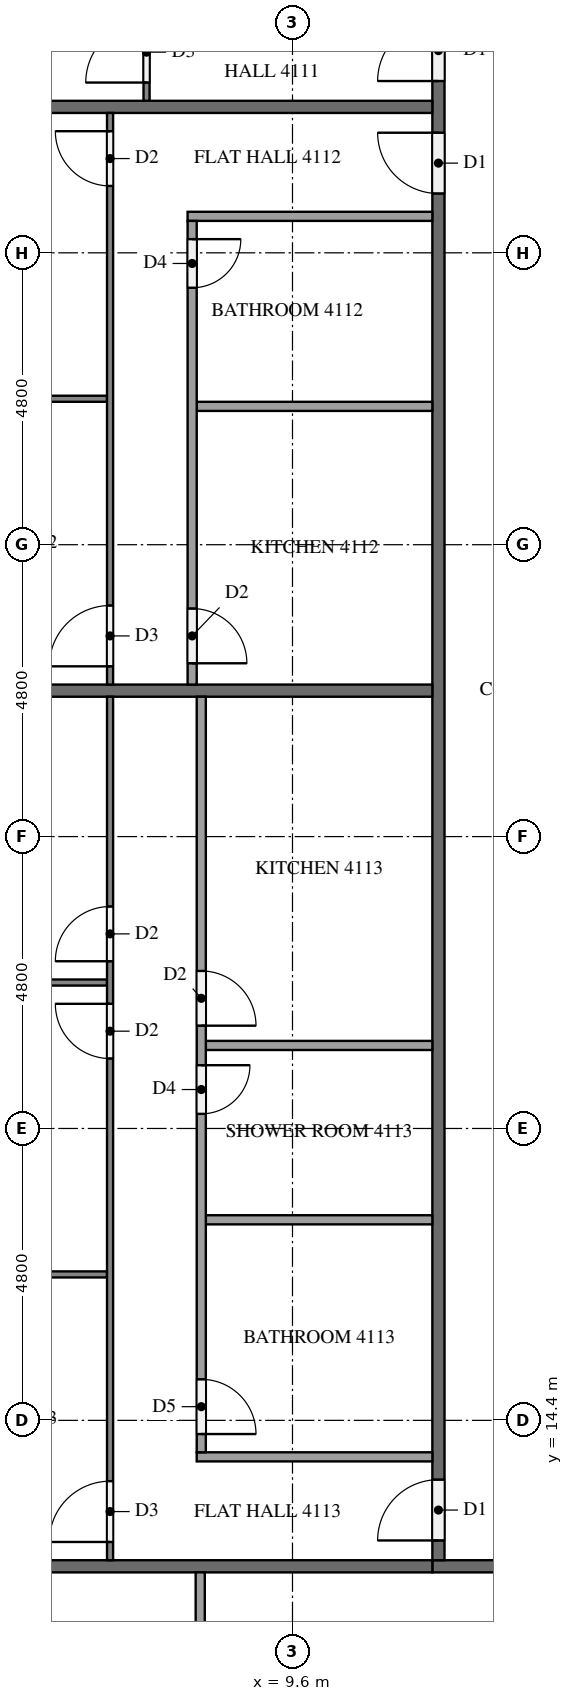
"""IFC4 building model, lengths in metres.
Left out: names, types, materials, properties, quantities, classifications, styles, units other than length and angle.
Written with IfcOpenShell. Run it as: python <this file> out.ifc"""

import sys

from ifc_helpers import new_model, si_unit, direction, frame, frame_2d, origin, place, context, subcontext, project, spatial, rectangle, extrude, element, fill, save


model = new_model("IFC4")
c1 = context("Model", 3, precision=1e-05, world=origin(), true_north=direction((0.0, 1.0)))
c2 = subcontext(c1, "Body", "Model", "MODEL_VIEW")
j1 = project(units=[si_unit("LENGTHUNIT", "METRE"), si_unit("PLANEANGLEUNIT", "RADIAN")], contexts=[c1])
p1 = place(None, origin())
s1 = spatial("IfcSite", under=j1, at=p1, CompositionType="ELEMENT")
p2 = place(p1, origin())
s2 = spatial("IfcBuilding", under=s1, at=p2, CompositionType="ELEMENT")
p3 = place(p2, frame((0.0, 0.0, 159.5)))
s3 = spatial("IfcBuildingStorey", under=s2, at=p3, CompositionType="ELEMENT", Elevation=159.5)
p4 = place(p3, frame((50.5, 12.0, 0.0), z_axis=(0.0, 0.0, 1.0), x_axis=(-1.0, 0.0, 0.0)))
e1 = element("IfcWall", 1, at=p4, inside=s3, PredefinedType="PARTITIONING", context=c2, shape_type="SweptSolid", body=[
    extrude(rectangle(XDim=38.6, YDim=0.2, at=frame_2d((19.3, 0.0))), origin(), (0.0, 0.0, 1.0), 3.2),
])
p5 = place(p4, frame((34.125, 0.0, 0.0)))
e2 = element("IfcOpeningElement", 2, at=p5, cuts=e1, PredefinedType="OPENING", context=c2, shape_type="SweptSolid", body=[
    extrude(rectangle(XDim=1.0, YDim=2.1, at=frame_2d((0.5, 1.05))), frame((0.0, 0.11, 0.0), z_axis=(0.0, -1.0, 0.0), x_axis=(1.0, 0.0, 0.0)), (0.0, 0.0, 1.0), 0.22),
])
p6 = place(p4, frame((32.275, 0.0, 0.0)))
e3 = element("IfcOpeningElement", 3, at=p6, cuts=e1, PredefinedType="OPENING", context=c2, shape_type="SweptSolid", body=[
    extrude(rectangle(XDim=1.0, YDim=2.1, at=frame_2d((0.5, 1.05))), frame((0.0, 0.11, 0.0), z_axis=(0.0, -1.0, 0.0), x_axis=(1.0, 0.0, 0.0)), (0.0, 0.0, 1.0), 0.22),
])
p7 = place(p4, frame((12.525, 0.0, 0.0)))
e4 = element("IfcOpeningElement", 4, at=p7, cuts=e1, PredefinedType="OPENING", context=c2, shape_type="SweptSolid", body=[
    extrude(rectangle(XDim=1.0, YDim=2.1, at=frame_2d((0.5, 1.05))), frame((0.0, 0.11, 0.0), z_axis=(0.0, -1.0, 0.0), x_axis=(1.0, 0.0, 0.0)), (0.0, 0.0, 1.0), 0.22),
])
p8 = place(p4, frame((10.625, 0.0, 0.0)))
e5 = element("IfcOpeningElement", 5, at=p8, cuts=e1, PredefinedType="OPENING", context=c2, shape_type="SweptSolid", body=[
    extrude(rectangle(XDim=1.1, YDim=2.1, at=frame_2d((0.55, 1.05))), frame((0.0, 0.11, 0.0), z_axis=(0.0, -1.0, 0.0), x_axis=(1.0, 0.0, 0.0)), (0.0, 0.0, 1.0), 0.22),
])
p9 = place(p3, frame((12.0, 12.1, 0.0), z_axis=(0.0, 0.0, 1.0), x_axis=(0.0, 1.0, 0.0)))
e6 = element("IfcWall", 6, at=p9, inside=s3, PredefinedType="PARTITIONING", context=c2, shape_type="SweptSolid", body=[
    extrude(rectangle(XDim=28.6, YDim=0.2, at=frame_2d((14.3, 0.0))), origin(), (0.0, 0.0, 1.0), 3.2),
])
p10 = place(p9, frame((24.325, 0.0, 0.0)))
e7 = element("IfcOpeningElement", 7, at=p10, cuts=e6, PredefinedType="OPENING", context=c2, shape_type="SweptSolid", body=[
    extrude(rectangle(XDim=1.0, YDim=2.1, at=frame_2d((0.5, 1.05))), frame((0.0, 0.11, 0.0), z_axis=(0.0, -1.0, 0.0), x_axis=(1.0, 0.0, 0.0)), (0.0, 0.0, 1.0), 0.22),
])
p11 = place(p9, frame((22.475, 0.0, 0.0)))
e8 = element("IfcOpeningElement", 8, at=p11, cuts=e6, PredefinedType="OPENING", context=c2, shape_type="SweptSolid", body=[
    extrude(rectangle(XDim=1.0, YDim=2.1, at=frame_2d((0.5, 1.05))), frame((0.0, 0.11, 0.0), z_axis=(0.0, -1.0, 0.0), x_axis=(1.0, 0.0, 0.0)), (0.0, 0.0, 1.0), 0.22),
])
p12 = place(p9, frame((0.325, 0.0, 0.0)))
e9 = element("IfcOpeningElement", 9, at=p12, cuts=e6, PredefinedType="OPENING", context=c2, shape_type="SweptSolid", body=[
    extrude(rectangle(XDim=1.0, YDim=2.1, at=frame_2d((0.5, 1.05))), frame((0.0, 0.11, 0.0), z_axis=(0.0, -1.0, 0.0), x_axis=(1.0, 0.0, 0.0)), (0.0, 0.0, 1.0), 0.22),
])
for number, where, z_axis, x_axis in (
    (10, (0.1, 12.0, 0.0), (0.0, 0.0, 1.0), (1.0, 0.0, 0.0)),
    (11, (0.1, 36.0, 0.0), (0.0, 0.0, 1.0), (1.0, 0.0, 0.0)),
    (12, (0.1, 26.4, 0.0), (0.0, 0.0, 1.0), (1.0, 0.0, 0.0)),
):
    element("IfcWall", number, at=place(p3, frame(where, z_axis=z_axis, x_axis=x_axis)), inside=s3, PredefinedType="PARTITIONING", context=c2, shape_type="SweptSolid", body=[
        extrude(rectangle(XDim=11.8, YDim=0.2, at=frame_2d((5.9, 0.0))), origin(), (0.0, 0.0, 1.0), 3.2),
    ])
p13 = place(p3, frame((8.083, 11.9, 0.0), z_axis=(0.0, 0.0, 1.0), x_axis=(0.0, -1.0, 0.0)))
e13 = element("IfcWall", 13, at=p13, inside=s3, PredefinedType="PARTITIONING", context=c2, shape_type="SweptSolid", body=[
    extrude(rectangle(XDim=2.975, YDim=0.15, at=frame_2d((1.487, 0.0))), origin(), (0.0, 0.0, 1.0), 3.2),
])
p14 = place(p3, frame((7.2, 36.1, 0.0), z_axis=(0.0, 0.0, 1.0), x_axis=(0.0, 1.0, 0.0)))
e14 = element("IfcWall", 14, at=p14, inside=s3, PredefinedType="PARTITIONING", context=c2, shape_type="SweptSolid", body=[
    extrude(rectangle(XDim=11.8, YDim=0.1, at=frame_2d((5.9, 0.0))), origin(), (0.0, 0.0, 1.0), 3.2),
])
p15 = place(p14, frame((0.3, 0.0, 0.0)))
e15 = element("IfcOpeningElement", 15, at=p15, cuts=e14, PredefinedType="OPENING", context=c2, shape_type="SweptSolid", body=[
    extrude(rectangle(XDim=1.0, YDim=2.1, at=frame_2d((0.5, 1.05))), frame((0.0, 0.06, 0.0), z_axis=(0.0, -1.0, 0.0), x_axis=(1.0, 0.0, 0.0)), (0.0, 0.0, 1.0), 0.12),
])
p16 = place(p14, frame((10.6, 0.0, 0.0)))
e16 = element("IfcOpeningElement", 16, at=p16, cuts=e14, PredefinedType="OPENING", context=c2, shape_type="SweptSolid", body=[
    extrude(rectangle(XDim=0.9, YDim=2.1, at=frame_2d((0.45, 1.05))), frame((0.0, 0.06, 0.0), z_axis=(0.0, -1.0, 0.0), x_axis=(1.0, 0.0, 0.0)), (0.0, 0.0, 1.0), 0.12),
])
p17 = place(p3, frame((6.55, 31.2, 0.0), z_axis=(0.0, 0.0, 1.0), x_axis=(-1.0, 0.0, 0.0)))
e17 = element("IfcWall", 17, at=p17, inside=s3, PredefinedType="PARTITIONING", context=c2, shape_type="SweptSolid", body=[
    extrude(rectangle(XDim=6.45, YDim=0.1, at=frame_2d((3.225, 0.0))), origin(), (0.0, 0.0, 1.0), 3.2),
])
p18 = place(p3, frame((6.6, 26.5, 0.0), z_axis=(0.0, 0.0, 1.0), x_axis=(0.0, 1.0, 0.0)))
e18 = element("IfcWall", 18, at=p18, inside=s3, PredefinedType="PARTITIONING", context=c2, shape_type="SweptSolid", body=[
    extrude(rectangle(XDim=9.4, YDim=0.1, at=frame_2d((4.7, 0.0))), origin(), (0.0, 0.0, 1.0), 3.2),
])
p19 = place(p18, frame((8.2, 0.0, 0.0)))
e19 = element("IfcOpeningElement", 19, at=p19, cuts=e18, PredefinedType="OPENING", context=c2, shape_type="SweptSolid", body=[
    extrude(rectangle(XDim=0.9, YDim=2.1, at=frame_2d((0.45, 1.05))), frame((0.0, 0.06, 0.0), z_axis=(0.0, -1.0, 0.0), x_axis=(1.0, 0.0, 0.0)), (0.0, 0.0, 1.0), 0.12),
])
p20 = place(p18, frame((0.3, 0.0, 0.0)))
e20 = element("IfcOpeningElement", 20, at=p20, cuts=e18, PredefinedType="OPENING", context=c2, shape_type="SweptSolid", body=[
    extrude(rectangle(XDim=1.0, YDim=2.1, at=frame_2d((0.5, 1.05))), frame((0.0, 0.06, 0.0), z_axis=(0.0, -1.0, 0.0), x_axis=(1.0, 0.0, 0.0)), (0.0, 0.0, 1.0), 0.12),
])
p21 = place(p3, frame((11.9, 31.075, 0.0), z_axis=(0.0, 0.0, 1.0), x_axis=(-1.0, 0.0, 0.0)))
e21 = element("IfcWall", 21, at=p21, inside=s3, PredefinedType="PARTITIONING", context=c2, shape_type="SweptSolid", body=[
    extrude(rectangle(XDim=3.875, YDim=0.15, at=frame_2d((1.938, 0.0))), origin(), (0.0, 0.0, 1.0), 3.2),
])
p22 = place(p3, frame((11.9, 34.2, 0.0), z_axis=(0.0, 0.0, 1.0), x_axis=(-1.0, 0.0, 0.0)))
e22 = element("IfcWall", 22, at=p22, inside=s3, PredefinedType="PARTITIONING", context=c2, shape_type="SweptSolid", body=[
    extrude(rectangle(XDim=4.025, YDim=0.15, at=frame_2d((2.012, 0.0))), origin(), (0.0, 0.0, 1.0), 3.2),
])
p23 = place(p3, frame((7.95, 34.125, 0.0), z_axis=(0.0, 0.0, 1.0), x_axis=(0.0, -1.0, 0.0)))
e23 = element("IfcWall", 23, at=p23, inside=s3, PredefinedType="PARTITIONING", context=c2, shape_type="SweptSolid", body=[
    extrude(rectangle(XDim=7.625, YDim=0.15, at=frame_2d((3.812, 0.0))), origin(), (0.0, 0.0, 1.0), 3.2),
])
p24 = place(p23, frame((0.3, 0.0, 0.0)))
e24 = element("IfcOpeningElement", 24, at=p24, cuts=e23, PredefinedType="OPENING", context=c2, shape_type="SweptSolid", body=[
    extrude(rectangle(XDim=0.8, YDim=2.1, at=frame_2d((0.4, 1.05))), frame((0.0, 0.085, 0.0), z_axis=(0.0, -1.0, 0.0), x_axis=(1.0, 0.0, 0.0)), (0.0, 0.0, 1.0), 0.17),
])
p25 = place(p23, frame((6.375, 0.0, 0.0)))
e25 = element("IfcOpeningElement", 25, at=p25, cuts=e23, PredefinedType="OPENING", context=c2, shape_type="SweptSolid", body=[
    extrude(rectangle(XDim=0.9, YDim=2.1, at=frame_2d((0.45, 1.05))), frame((0.0, 0.085, 0.0), z_axis=(0.0, -1.0, 0.0), x_axis=(1.0, 0.0, 0.0)), (0.0, 0.0, 1.0), 0.17),
])
for number, where, z_axis, x_axis in (
    (26, (6.55, 16.8, 0.0), (0.0, 0.0, 1.0), (-1.0, 0.0, 0.0)),
    (27, (6.55, 21.6, 0.0), (0.0, 0.0, 1.0), (-1.0, 0.0, 0.0)),
):
    element("IfcWall", number, at=place(p3, frame(where, z_axis=z_axis, x_axis=x_axis)), inside=s3, PredefinedType="PARTITIONING", context=c2, shape_type="SweptSolid", body=[
        extrude(rectangle(XDim=6.45, YDim=0.1, at=frame_2d((3.225, 0.0))), origin(), (0.0, 0.0, 1.0), 3.2),
    ])
p26 = place(p3, frame((6.6, 12.1, 0.0), z_axis=(0.0, 0.0, 1.0), x_axis=(0.0, 1.0, 0.0)))
e28 = element("IfcWall", 28, at=p26, inside=s3, PredefinedType="PARTITIONING", context=c2, shape_type="SweptSolid", body=[
    extrude(rectangle(XDim=14.2, YDim=0.1, at=frame_2d((7.1, 0.0))), origin(), (0.0, 0.0, 1.0), 3.2),
])
p27 = place(p26, frame((0.3, 0.0, 0.0)))
e29 = element("IfcOpeningElement", 29, at=p27, cuts=e28, PredefinedType="OPENING", context=c2, shape_type="SweptSolid", body=[
    extrude(rectangle(XDim=1.0, YDim=2.1, at=frame_2d((0.5, 1.05))), frame((0.0, 0.06, 0.0), z_axis=(0.0, -1.0, 0.0), x_axis=(1.0, 0.0, 0.0)), (0.0, 0.0, 1.0), 0.12),
])
p28 = place(p26, frame((8.25, 0.0, 0.0)))
e30 = element("IfcOpeningElement", 30, at=p28, cuts=e28, PredefinedType="OPENING", context=c2, shape_type="SweptSolid", body=[
    extrude(rectangle(XDim=0.9, YDim=2.1, at=frame_2d((0.45, 1.05))), frame((0.0, 0.06, 0.0), z_axis=(0.0, -1.0, 0.0), x_axis=(1.0, 0.0, 0.0)), (0.0, 0.0, 1.0), 0.12),
])
p29 = place(p26, frame((9.85, 0.0, 0.0)))
e31 = element("IfcOpeningElement", 31, at=p29, cuts=e28, PredefinedType="OPENING", context=c2, shape_type="SweptSolid", body=[
    extrude(rectangle(XDim=0.9, YDim=2.1, at=frame_2d((0.45, 1.05))), frame((0.0, 0.06, 0.0), z_axis=(0.0, -1.0, 0.0), x_axis=(1.0, 0.0, 0.0)), (0.0, 0.0, 1.0), 0.12),
])
for number, where, z_axis, x_axis in (
    (32, (11.9, 17.698, 0.0), (0.0, 0.0, 1.0), (-1.0, 0.0, 0.0)),
    (33, (11.9, 20.565, 0.0), (0.0, 0.0, 1.0), (-1.0, 0.0, 0.0)),
):
    element("IfcWall", number, at=place(p3, frame(where, z_axis=z_axis, x_axis=x_axis)), inside=s3, PredefinedType="PARTITIONING", context=c2, shape_type="SweptSolid", body=[
        extrude(rectangle(XDim=3.725, YDim=0.15, at=frame_2d((1.862, 0.0))), origin(), (0.0, 0.0, 1.0), 3.2),
    ])
p30 = place(p3, frame((11.9, 13.8, 0.0), z_axis=(0.0, 0.0, 1.0), x_axis=(-1.0, 0.0, 0.0)))
e34 = element("IfcWall", 34, at=p30, inside=s3, PredefinedType="PARTITIONING", context=c2, shape_type="SweptSolid", body=[
    extrude(rectangle(XDim=3.875, YDim=0.15, at=frame_2d((1.938, 0.0))), origin(), (0.0, 0.0, 1.0), 3.2),
])
p31 = place(p3, frame((8.1, 26.3, 0.0), z_axis=(0.0, 0.0, 1.0), x_axis=(0.0, -1.0, 0.0)))
e35 = element("IfcWall", 35, at=p31, inside=s3, PredefinedType="PARTITIONING", context=c2, shape_type="SweptSolid", body=[
    extrude(rectangle(XDim=12.425, YDim=0.15, at=frame_2d((6.212, 0.0))), origin(), (0.0, 0.0, 1.0), 3.2),
])
p32 = place(p31, frame((11.225, 0.0, 0.0)))
e36 = element("IfcOpeningElement", 36, at=p32, cuts=e35, PredefinedType="OPENING", context=c2, shape_type="SweptSolid", body=[
    extrude(rectangle(XDim=0.9, YDim=2.1, at=frame_2d((0.45, 1.05))), frame((0.0, 0.085, 0.0), z_axis=(0.0, -1.0, 0.0), x_axis=(1.0, 0.0, 0.0)), (0.0, 0.0, 1.0), 0.17),
])
p33 = place(p31, frame((6.06, 0.0, 0.0)))
e37 = element("IfcOpeningElement", 37, at=p33, cuts=e35, PredefinedType="OPENING", context=c2, shape_type="SweptSolid", body=[
    extrude(rectangle(XDim=0.8, YDim=2.1, at=frame_2d((0.4, 1.05))), frame((0.0, 0.085, 0.0), z_axis=(0.0, -1.0, 0.0), x_axis=(1.0, 0.0, 0.0)), (0.0, 0.0, 1.0), 0.17),
])
p34 = place(p31, frame((4.51, 0.0, 0.0)))
e38 = element("IfcOpeningElement", 38, at=p34, cuts=e35, PredefinedType="OPENING", context=c2, shape_type="SweptSolid", body=[
    extrude(rectangle(XDim=0.9, YDim=2.1, at=frame_2d((0.45, 1.05))), frame((0.0, 0.085, 0.0), z_axis=(0.0, -1.0, 0.0), x_axis=(1.0, 0.0, 0.0)), (0.0, 0.0, 1.0), 0.17),
])
p35 = place(p10, origin())
e39 = element("IfcDoor", 39, at=p35, inside=s3, OperationType="SINGLE_SWING_LEFT", PredefinedType="DOOR", context=c2, shape_type="SweptSolid", body=[
    extrude(rectangle(XDim=1.0, YDim=2.1, at=frame_2d((0.5, 1.05))), frame((0.0, 0.025, 0.0), z_axis=(0.0, -1.0, 0.0), x_axis=(1.0, 0.0, 0.0)), (0.0, 0.0, 1.0), 0.05),
])
fill(e7, e39)
p36 = place(p11, origin())
e40 = element("IfcDoor", 40, at=p36, inside=s3, OperationType="SINGLE_SWING_RIGHT", PredefinedType="DOOR", context=c2, shape_type="SweptSolid", body=[
    extrude(rectangle(XDim=1.0, YDim=2.1, at=frame_2d((0.5, 1.05))), frame((0.0, 0.025, 0.0), z_axis=(0.0, -1.0, 0.0), x_axis=(1.0, 0.0, 0.0)), (0.0, 0.0, 1.0), 0.05),
])
fill(e8, e40)
p37 = place(p12, origin())
e41 = element("IfcDoor", 41, at=p37, inside=s3, OperationType="SINGLE_SWING_LEFT", PredefinedType="DOOR", context=c2, shape_type="SweptSolid", body=[
    extrude(rectangle(XDim=1.0, YDim=2.1, at=frame_2d((0.5, 1.05))), frame((0.0, 0.025, 0.0), z_axis=(0.0, -1.0, 0.0), x_axis=(1.0, 0.0, 0.0)), (0.0, 0.0, 1.0), 0.05),
])
fill(e9, e41)
p38 = place(p15, origin())
e42 = element("IfcDoor", 42, at=p38, inside=s3, OperationType="SINGLE_SWING_LEFT", PredefinedType="DOOR", context=c2, shape_type="SweptSolid", body=[
    extrude(rectangle(XDim=1.0, YDim=2.1, at=frame_2d((0.5, 1.05))), frame((0.0, 0.025, 0.0), z_axis=(0.0, -1.0, 0.0), x_axis=(1.0, 0.0, 0.0)), (0.0, 0.0, 1.0), 0.05),
])
fill(e15, e42)
p39 = place(p19, origin())
e43 = element("IfcDoor", 43, at=p39, inside=s3, OperationType="SINGLE_SWING_RIGHT", PredefinedType="DOOR", context=c2, shape_type="SweptSolid", body=[
    extrude(rectangle(XDim=0.9, YDim=2.1, at=frame_2d((0.45, 1.05))), frame((0.0, 0.025, 0.0), z_axis=(0.0, -1.0, 0.0), x_axis=(1.0, 0.0, 0.0)), (0.0, 0.0, 1.0), 0.05),
])
fill(e19, e43)
p40 = place(p20, origin())
e44 = element("IfcDoor", 44, at=p40, inside=s3, OperationType="SINGLE_SWING_LEFT", PredefinedType="DOOR", context=c2, shape_type="SweptSolid", body=[
    extrude(rectangle(XDim=1.0, YDim=2.1, at=frame_2d((0.5, 1.05))), frame((0.0, 0.025, 0.0), z_axis=(0.0, -1.0, 0.0), x_axis=(1.0, 0.0, 0.0)), (0.0, 0.0, 1.0), 0.05),
])
fill(e20, e44)
p41 = place(p24, origin())
e45 = element("IfcDoor", 45, at=p41, inside=s3, OperationType="SINGLE_SWING_LEFT", PredefinedType="DOOR", context=c2, shape_type="SweptSolid", body=[
    extrude(rectangle(XDim=0.8, YDim=2.1, at=frame_2d((0.4, 1.05))), frame((0.0, 0.025, 0.0), z_axis=(0.0, -1.0, 0.0), x_axis=(1.0, 0.0, 0.0)), (0.0, 0.0, 1.0), 0.05),
])
fill(e24, e45)
p42 = place(p25, origin())
e46 = element("IfcDoor", 46, at=p42, inside=s3, OperationType="SINGLE_SWING_RIGHT", PredefinedType="DOOR", context=c2, shape_type="SweptSolid", body=[
    extrude(rectangle(XDim=0.9, YDim=2.1, at=frame_2d((0.45, 1.05))), frame((0.0, 0.025, 0.0), z_axis=(0.0, -1.0, 0.0), x_axis=(1.0, 0.0, 0.0)), (0.0, 0.0, 1.0), 0.05),
])
fill(e25, e46)
p43 = place(p27, origin())
e47 = element("IfcDoor", 47, at=p43, inside=s3, OperationType="SINGLE_SWING_LEFT", PredefinedType="DOOR", context=c2, shape_type="SweptSolid", body=[
    extrude(rectangle(XDim=1.0, YDim=2.1, at=frame_2d((0.5, 1.05))), frame((0.0, 0.025, 0.0), z_axis=(0.0, -1.0, 0.0), x_axis=(1.0, 0.0, 0.0)), (0.0, 0.0, 1.0), 0.05),
])
fill(e29, e47)
p44 = place(p28, origin())
e48 = element("IfcDoor", 48, at=p44, inside=s3, OperationType="SINGLE_SWING_RIGHT", PredefinedType="DOOR", context=c2, shape_type="SweptSolid", body=[
    extrude(rectangle(XDim=0.9, YDim=2.1, at=frame_2d((0.45, 1.05))), frame((0.0, 0.025, 0.0), z_axis=(0.0, -1.0, 0.0), x_axis=(1.0, 0.0, 0.0)), (0.0, 0.0, 1.0), 0.05),
])
fill(e30, e48)
p45 = place(p29, origin())
e49 = element("IfcDoor", 49, at=p45, inside=s3, OperationType="SINGLE_SWING_LEFT", PredefinedType="DOOR", context=c2, shape_type="SweptSolid", body=[
    extrude(rectangle(XDim=0.9, YDim=2.1, at=frame_2d((0.45, 1.05))), frame((0.0, 0.025, 0.0), z_axis=(0.0, -1.0, 0.0), x_axis=(1.0, 0.0, 0.0)), (0.0, 0.0, 1.0), 0.05),
])
fill(e31, e49)
p46 = place(p32, origin())
e50 = element("IfcDoor", 50, at=p46, inside=s3, OperationType="SINGLE_SWING_RIGHT", PredefinedType="DOOR", context=c2, shape_type="SweptSolid", body=[
    extrude(rectangle(XDim=0.9, YDim=2.1, at=frame_2d((0.45, 1.05))), frame((0.0, 0.025, 0.0), z_axis=(0.0, -1.0, 0.0), x_axis=(1.0, 0.0, 0.0)), (0.0, 0.0, 1.0), 0.05),
])
fill(e36, e50)
p47 = place(p33, origin())
e51 = element("IfcDoor", 51, at=p47, inside=s3, OperationType="SINGLE_SWING_LEFT", PredefinedType="DOOR", context=c2, shape_type="SweptSolid", body=[
    extrude(rectangle(XDim=0.8, YDim=2.1, at=frame_2d((0.4, 1.05))), frame((0.0, 0.025, 0.0), z_axis=(0.0, -1.0, 0.0), x_axis=(1.0, 0.0, 0.0)), (0.0, 0.0, 1.0), 0.05),
])
fill(e37, e51)
p48 = place(p34, origin())
e52 = element("IfcDoor", 52, at=p48, inside=s3, OperationType="SINGLE_SWING_RIGHT", PredefinedType="DOOR", context=c2, shape_type="SweptSolid", body=[
    extrude(rectangle(XDim=0.9, YDim=2.1, at=frame_2d((0.45, 1.05))), frame((0.0, 0.025, 0.0), z_axis=(0.0, -1.0, 0.0), x_axis=(1.0, 0.0, 0.0)), (0.0, 0.0, 1.0), 0.05),
])
fill(e38, e52)
save(model, sys.argv[1])
